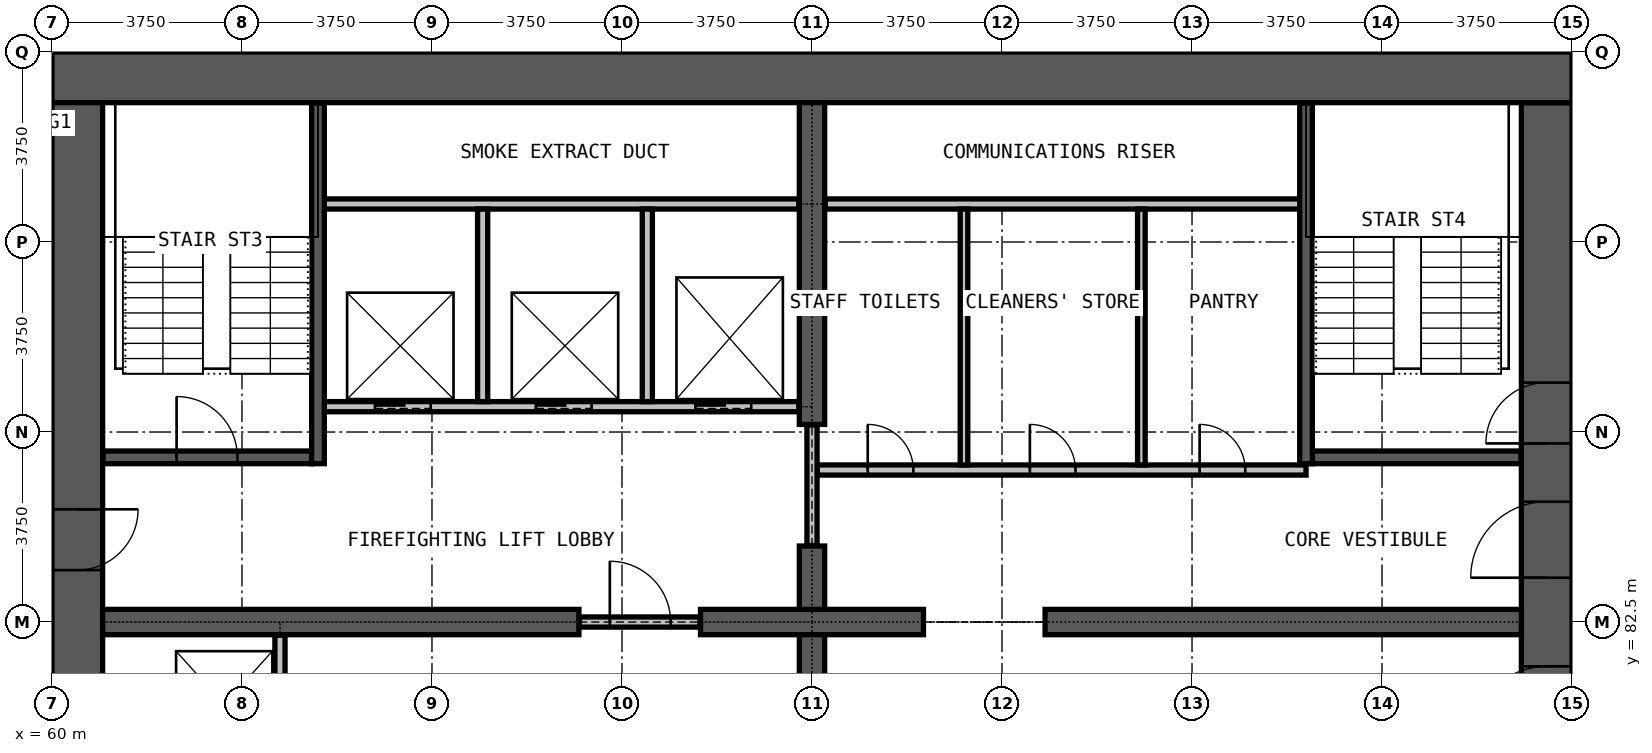
"""IFC4 building model, lengths in metres.
Left out: names, types, materials, properties, quantities, classifications, styles, units other than length and angle.
Written with IfcOpenShell. Run it as: python <this file> out.ifc"""

import sys

from ifc_helpers import new_model, si_unit, direction, frame, frame_2d, origin, place, context, subcontext, project, spatial, rectangle, extrude, element, fill, save


model = new_model("IFC4")
c1 = context("Model", 3, precision=1e-05, world=origin(), true_north=direction((0.0, 1.0)))
c2 = subcontext(c1, "Body", "Model", "MODEL_VIEW")
j1 = project(units=[si_unit("LENGTHUNIT", "METRE"), si_unit("PLANEANGLEUNIT", "RADIAN")], contexts=[c1])
p1 = place(None, origin())
s1 = spatial("IfcSite", under=j1, at=p1, CompositionType="ELEMENT")
p2 = place(p1, origin())
s2 = spatial("IfcBuilding", under=s1, at=p2, CompositionType="ELEMENT")
p3 = place(p2, frame((0.0, 0.0, 89.0)))
s3 = spatial("IfcBuildingStorey", under=s2, at=p3, CompositionType="ELEMENT", Elevation=89.0)
p4 = place(p3, frame((89.5, 72.25, 0.0), z_axis=(0.0, 0.0, 1.0), x_axis=(0.0, 1.0, 0.0)))
e1 = element("IfcWall", 1, at=p4, inside=s3, PredefinedType="SHEAR", context=c2, shape_type="SweptSolid", body=[
    extrude(rectangle(XDim=20.5, YDim=1.0, at=frame_2d((10.25, 0.0))), origin(), (0.0, 0.0, 1.0), 3.3),
])
p5 = place(p4, frame((0.275, 0.0, 0.0)))
e2 = element("IfcOpeningElement", 2, at=p5, cuts=e1, PredefinedType="OPENING", context=c2, shape_type="SweptSolid", body=[
    extrude(rectangle(XDim=1.2, YDim=2.2, at=frame_2d((0.6, 1.1))), frame((0.0, 0.51, 0.0), z_axis=(0.0, -1.0, 0.0), x_axis=(1.0, 0.0, 0.0)), (0.0, 0.0, 1.0), 1.02),
])
p6 = place(p4, frame((13.775, 0.0, 0.0)))
e3 = element("IfcOpeningElement", 3, at=p6, cuts=e1, PredefinedType="OPENING", context=c2, shape_type="SweptSolid", body=[
    extrude(rectangle(XDim=1.2, YDim=2.2, at=frame_2d((0.6, 1.1))), frame((0.0, 0.51, 0.0), z_axis=(0.0, -1.0, 0.0), x_axis=(1.0, 0.0, 0.0)), (0.0, 0.0, 1.0), 1.02),
])
p7 = place(p4, frame((7.875, 0.0, 0.0)))
e4 = element("IfcOpeningElement", 4, at=p7, cuts=e1, PredefinedType="OPENING", context=c2, shape_type="SweptSolid", body=[
    extrude(rectangle(XDim=1.5, YDim=2.2, at=frame_2d((0.75, 1.1))), frame((0.0, 0.51, 0.0), z_axis=(0.0, -1.0, 0.0), x_axis=(1.0, 0.0, 0.0)), (0.0, 0.0, 1.0), 1.02),
])
p8 = place(p4, frame((11.125, 0.0, 0.0)))
e5 = element("IfcOpeningElement", 5, at=p8, cuts=e1, PredefinedType="OPENING", context=c2, shape_type="SweptSolid", body=[
    extrude(rectangle(XDim=1.5, YDim=2.2, at=frame_2d((0.75, 1.1))), frame((0.0, 0.51, 0.0), z_axis=(0.0, -1.0, 0.0), x_axis=(1.0, 0.0, 0.0)), (0.0, 0.0, 1.0), 1.02),
])
p9 = place(p3, frame((90.0, 93.25, 0.0), z_axis=(0.0, 0.0, 1.0), x_axis=(-1.0, 0.0, 0.0)))
e6 = element("IfcWall", 6, at=p9, inside=s3, PredefinedType="SHEAR", context=c2, shape_type="SweptSolid", body=[
    extrude(rectangle(XDim=30.0, YDim=1.0, at=frame_2d((15.0, 0.0))), origin(), (0.0, 0.0, 1.0), 3.3),
])
p10 = place(p3, frame((60.5, 92.75, 0.0), z_axis=(0.0, 0.0, 1.0), x_axis=(0.0, -1.0, 0.0)))
e7 = element("IfcWall", 7, at=p10, inside=s3, PredefinedType="SHEAR", context=c2, shape_type="SweptSolid", body=[
    extrude(rectangle(XDim=20.5, YDim=1.0, at=frame_2d((10.25, 0.0))), origin(), (0.0, 0.0, 1.0), 3.3),
])
p11 = place(p10, frame((19.025, 0.0, 0.0)))
e8 = element("IfcOpeningElement", 8, at=p11, cuts=e7, PredefinedType="OPENING", context=c2, shape_type="SweptSolid", body=[
    extrude(rectangle(XDim=1.2, YDim=2.2, at=frame_2d((0.6, 1.1))), frame((0.0, 0.51, 0.0), z_axis=(0.0, -1.0, 0.0), x_axis=(1.0, 0.0, 0.0)), (0.0, 0.0, 1.0), 1.02),
])
p12 = place(p10, frame((8.025, 0.0, 0.0)))
e9 = element("IfcOpeningElement", 9, at=p12, cuts=e7, PredefinedType="OPENING", context=c2, shape_type="SweptSolid", body=[
    extrude(rectangle(XDim=1.2, YDim=2.2, at=frame_2d((0.6, 1.1))), frame((0.0, 0.51, 0.0), z_axis=(0.0, -1.0, 0.0), x_axis=(1.0, 0.0, 0.0)), (0.0, 0.0, 1.0), 1.02),
])
p13 = place(p3, frame((61.0, 82.5, 0.0), z_axis=(0.0, 0.0, 1.0), x_axis=(1.0, 0.0, 0.0)))
e10 = element("IfcWall", 10, at=p13, inside=s3, PredefinedType="SHEAR", context=c2, shape_type="SweptSolid", body=[
    extrude(rectangle(XDim=9.4, YDim=0.5, at=frame_2d((4.7, 0.0))), origin(), (0.0, 0.0, 1.0), 3.3),
])
p14 = place(p3, frame((72.8, 82.5, 0.0), z_axis=(0.0, 0.0, 1.0), x_axis=(1.0, 0.0, 0.0)))
e11 = element("IfcWall", 11, at=p14, inside=s3, PredefinedType="SHEAR", context=c2, shape_type="SweptSolid", body=[
    extrude(rectangle(XDim=4.4, YDim=0.5, at=frame_2d((2.2, 0.0))), origin(), (0.0, 0.0, 1.0), 3.3),
])
p15 = place(p3, frame((79.6, 82.5, 0.0), z_axis=(0.0, 0.0, 1.0), x_axis=(1.0, 0.0, 0.0)))
e12 = element("IfcWall", 12, at=p15, inside=s3, PredefinedType="SHEAR", context=c2, shape_type="SweptSolid", body=[
    extrude(rectangle(XDim=9.4, YDim=0.5, at=frame_2d((4.7, 0.0))), origin(), (0.0, 0.0, 1.0), 3.3),
])
for number, where, z_axis, x_axis in (
    (13, (75.0, 81.0, 0.0), (0.0, 0.0, 1.0), (0.0, 1.0, 0.0)),
    (14, (75.0, 82.75, 0.0), (0.0, 0.0, 1.0), (0.0, 1.0, 0.0)),
):
    element("IfcWall", number, at=place(p3, frame(where, z_axis=z_axis, x_axis=x_axis)), inside=s3, PredefinedType="SHEAR", context=c2, shape_type="SweptSolid", body=[
        extrude(rectangle(XDim=1.25, YDim=0.5, at=frame_2d((0.625, 0.0))), origin(), (0.0, 0.0, 1.0), 3.3),
    ])
p16 = place(p3, frame((75.0, 86.4, 0.0), z_axis=(0.0, 0.0, 1.0), x_axis=(0.0, 1.0, 0.0)))
e15 = element("IfcWall", 15, at=p16, inside=s3, PredefinedType="SHEAR", context=c2, shape_type="SweptSolid", body=[
    extrude(rectangle(XDim=6.35, YDim=0.5, at=frame_2d((3.175, 0.0))), origin(), (0.0, 0.0, 1.0), 3.3),
])
p17 = place(p3, frame((70.41, 82.5, 0.0), z_axis=(0.0, 0.0, 1.0), x_axis=(1.0, 0.0, 0.0)))
e16 = element("IfcWall", 16, at=p17, inside=s3, PredefinedType="PARTITIONING", context=c2, shape_type="SweptSolid", body=[
    extrude(rectangle(XDim=2.38, YDim=0.2, at=frame_2d((1.19, 0.0))), origin(), (0.0, 0.0, 1.0), 2.4),
])
p18 = place(p17, frame((0.6, 0.0, 0.0)))
e17 = element("IfcOpeningElement", 17, at=p18, cuts=e16, PredefinedType="OPENING", context=c2, shape_type="SweptSolid", body=[
    extrude(rectangle(XDim=1.2, YDim=2.2, at=frame_2d((0.6, 1.1))), frame((0.0, 0.11, 0.0), z_axis=(0.0, -1.0, 0.0), x_axis=(1.0, 0.0, 0.0)), (0.0, 0.0, 1.0), 0.22),
])
p19 = place(p3, frame((75.1, 85.5, 0.0), z_axis=(0.0, 0.0, 1.0), x_axis=(1.0, 0.0, 0.0)))
e18 = element("IfcWall", 18, at=p19, inside=s3, PredefinedType="PARTITIONING", context=c2, shape_type="SweptSolid", body=[
    extrude(rectangle(XDim=9.65, YDim=0.2, at=frame_2d((4.825, 0.0))), origin(), (0.0, 0.0, 1.0), 3.0),
])
p20 = place(p19, frame((1.0, 0.0, 0.0)))
e19 = element("IfcOpeningElement", 19, at=p20, cuts=e18, PredefinedType="OPENING", context=c2, shape_type="SweptSolid", body=[
    extrude(rectangle(XDim=0.9, YDim=2.2, at=frame_2d((0.45, 1.1))), frame((0.0, 0.11, 0.0), z_axis=(0.0, -1.0, 0.0), x_axis=(1.0, 0.0, 0.0)), (0.0, 0.0, 1.0), 0.22),
])
p21 = place(p19, frame((4.2, 0.0, 0.0)))
e20 = element("IfcOpeningElement", 20, at=p21, cuts=e18, PredefinedType="OPENING", context=c2, shape_type="SweptSolid", body=[
    extrude(rectangle(XDim=0.9, YDim=2.2, at=frame_2d((0.45, 1.1))), frame((0.0, 0.11, 0.0), z_axis=(0.0, -1.0, 0.0), x_axis=(1.0, 0.0, 0.0)), (0.0, 0.0, 1.0), 0.22),
])
p22 = place(p19, frame((7.55, 0.0, 0.0)))
e21 = element("IfcOpeningElement", 21, at=p22, cuts=e18, PredefinedType="OPENING", context=c2, shape_type="SweptSolid", body=[
    extrude(rectangle(XDim=0.9, YDim=2.2, at=frame_2d((0.45, 1.1))), frame((0.0, 0.11, 0.0), z_axis=(0.0, -1.0, 0.0), x_axis=(1.0, 0.0, 0.0)), (0.0, 0.0, 1.0), 0.22),
])
p23 = place(p3, frame((75.26, 90.75, 0.0), z_axis=(0.0, 0.0, 1.0), x_axis=(1.0, 0.0, 0.0)))
e22 = element("IfcWall", 22, at=p23, inside=s3, PredefinedType="PARTITIONING", context=c2, shape_type="SweptSolid", body=[
    extrude(rectangle(XDim=9.365, YDim=0.2, at=frame_2d((4.683, 0.0))), origin(), (0.0, 0.0, 1.0), 3.0),
])
p24 = place(p3, frame((75.0, 84.01, 0.0), z_axis=(0.0, 0.0, 1.0), x_axis=(0.0, 1.0, 0.0)))
e23 = element("IfcWall", 23, at=p24, inside=s3, PredefinedType="PARTITIONING", context=c2, shape_type="SweptSolid", body=[
    extrude(rectangle(XDim=2.38, YDim=0.2, at=frame_2d((1.19, 0.0))), origin(), (0.0, 0.0, 1.0), 2.4),
])
for number, where, z_axis, x_axis in (
    (24, (78.0, 85.6, 0.0), (0.0, 0.0, 1.0), (0.0, 1.0, 0.0)),
    (25, (81.5, 85.6, 0.0), (0.0, 0.0, 1.0), (0.0, 1.0, 0.0)),
):
    element("IfcWall", number, at=place(p3, frame(where, z_axis=z_axis, x_axis=x_axis)), inside=s3, PredefinedType="PARTITIONING", context=c2, shape_type="SweptSolid", body=[
        extrude(rectangle(XDim=5.05, YDim=0.15, at=frame_2d((2.525, 0.0))), origin(), (0.0, 0.0, 1.0), 3.0),
    ])
p25 = place(p3, frame((65.375, 86.75, 0.0), z_axis=(0.0, 0.0, 1.0), x_axis=(1.0, 0.0, 0.0)))
e26 = element("IfcWall", 26, at=p25, inside=s3, PredefinedType="PARTITIONING", context=c2, shape_type="SweptSolid", body=[
    extrude(rectangle(XDim=9.365, YDim=0.2, at=frame_2d((4.683, 0.0))), origin(), (0.0, 0.0, 1.0), 3.0),
])
p26 = place(p25, frame((1.0, 0.0, 0.0)))
e27 = element("IfcOpeningElement", 27, at=p26, cuts=e26, PredefinedType="OPENING", context=c2, shape_type="SweptSolid", body=[
    extrude(rectangle(XDim=1.1, YDim=2.2, at=frame_2d((0.55, 1.1))), frame((0.0, 0.11, 0.0), z_axis=(0.0, -1.0, 0.0), x_axis=(1.0, 0.0, 0.0)), (0.0, 0.0, 1.0), 0.22),
])
p27 = place(p25, frame((4.175, 0.0, 0.0)))
e28 = element("IfcOpeningElement", 28, at=p27, cuts=e26, PredefinedType="OPENING", context=c2, shape_type="SweptSolid", body=[
    extrude(rectangle(XDim=1.1, YDim=2.2, at=frame_2d((0.55, 1.1))), frame((0.0, 0.11, 0.0), z_axis=(0.0, -1.0, 0.0), x_axis=(1.0, 0.0, 0.0)), (0.0, 0.0, 1.0), 0.22),
])
p28 = place(p25, frame((7.325, 0.0, 0.0)))
e29 = element("IfcOpeningElement", 29, at=p28, cuts=e26, PredefinedType="OPENING", context=c2, shape_type="SweptSolid", body=[
    extrude(rectangle(XDim=1.1, YDim=2.2, at=frame_2d((0.55, 1.1))), frame((0.0, 0.11, 0.0), z_axis=(0.0, -1.0, 0.0), x_axis=(1.0, 0.0, 0.0)), (0.0, 0.0, 1.0), 0.22),
])
p29 = place(p3, frame((65.375, 90.75, 0.0), z_axis=(0.0, 0.0, 1.0), x_axis=(1.0, 0.0, 0.0)))
e30 = element("IfcWall", 30, at=p29, inside=s3, PredefinedType="PARTITIONING", context=c2, shape_type="SweptSolid", body=[
    extrude(rectangle(XDim=9.365, YDim=0.2, at=frame_2d((4.683, 0.0))), origin(), (0.0, 0.0, 1.0), 3.0),
])
p30 = place(p3, frame((64.5, 79.375, 0.0), z_axis=(0.0, 0.0, 1.0), x_axis=(0.0, 1.0, 0.0)))
e31 = element("IfcWall", 31, at=p30, inside=s3, PredefinedType="PARTITIONING", context=c2, shape_type="SweptSolid", body=[
    extrude(rectangle(XDim=2.865, YDim=0.2, at=frame_2d((1.433, 0.0))), origin(), (0.0, 0.0, 1.0), 3.0),
])
for number, where, z_axis, x_axis in (
    (32, (68.5, 86.85, 0.0), (0.0, 0.0, 1.0), (0.0, 1.0, 0.0)),
    (33, (71.75, 86.85, 0.0), (0.0, 0.0, 1.0), (0.0, 1.0, 0.0)),
):
    element("IfcWall", number, at=place(p3, frame(where, z_axis=z_axis, x_axis=x_axis)), inside=s3, PredefinedType="PARTITIONING", context=c2, shape_type="SweptSolid", body=[
        extrude(rectangle(XDim=3.8, YDim=0.2, at=frame_2d((1.9, 0.0))), origin(), (0.0, 0.0, 1.0), 3.0),
    ])
p31 = place(p3, frame((61.01, 85.75, 0.0), z_axis=(0.0, 0.0, 1.0), x_axis=(1.0, 0.0, 0.0)))
e34 = element("IfcWall", 34, at=p31, inside=s3, PredefinedType="PARTITIONING", context=c2, shape_type="SweptSolid", body=[
    extrude(rectangle(XDim=4.115, YDim=0.25, at=frame_2d((2.058, 0.0))), origin(), (0.0, 0.0, 1.0), 3.0),
])
p32 = place(p31, frame((1.45, 0.0, 0.0)))
e35 = element("IfcOpeningElement", 35, at=p32, cuts=e34, PredefinedType="OPENING", context=c2, shape_type="SweptSolid", body=[
    extrude(rectangle(XDim=1.2, YDim=2.2, at=frame_2d((0.6, 1.1))), frame((0.0, 0.135, 0.0), z_axis=(0.0, -1.0, 0.0), x_axis=(1.0, 0.0, 0.0)), (0.0, 0.0, 1.0), 0.27),
])
p33 = place(p3, frame((84.875, 85.75, 0.0), z_axis=(0.0, 0.0, 1.0), x_axis=(1.0, 0.0, 0.0)))
e36 = element("IfcWall", 36, at=p33, inside=s3, PredefinedType="PARTITIONING", context=c2, shape_type="SweptSolid", body=[
    extrude(rectangle(XDim=4.115, YDim=0.25, at=frame_2d((2.058, 0.0))), origin(), (0.0, 0.0, 1.0), 3.0),
])
for number, where, z_axis, x_axis in (
    (37, (65.25, 85.625, 0.0), (0.0, 0.0, 1.0), (0.0, 1.0, 0.0)),
    (38, (84.75, 85.625, 0.0), (0.0, 0.0, 1.0), (0.0, 1.0, 0.0)),
):
    element("IfcWall", number, at=place(p3, frame(where, z_axis=z_axis, x_axis=x_axis)), inside=s3, PredefinedType="PARTITIONING", context=c2, shape_type="SweptSolid", body=[
        extrude(rectangle(XDim=7.115, YDim=0.25, at=frame_2d((3.558, 0.0))), origin(), (0.0, 0.0, 1.0), 3.0),
    ])
p34 = place(p26, origin())
e39 = element("IfcDoor", 39, at=p34, inside=s3, OperationType="DOUBLE_DOOR_SLIDING", PredefinedType="DOOR", context=c2, shape_type="SweptSolid", body=[
    extrude(rectangle(XDim=1.1, YDim=2.2, at=frame_2d((0.55, 1.1))), frame((0.0, 0.025, 0.0), z_axis=(0.0, -1.0, 0.0), x_axis=(1.0, 0.0, 0.0)), (0.0, 0.0, 1.0), 0.05),
])
fill(e27, e39)
p35 = place(p27, origin())
e40 = element("IfcDoor", 40, at=p35, inside=s3, OperationType="DOUBLE_DOOR_SLIDING", PredefinedType="DOOR", context=c2, shape_type="SweptSolid", body=[
    extrude(rectangle(XDim=1.1, YDim=2.2, at=frame_2d((0.55, 1.1))), frame((0.0, 0.025, 0.0), z_axis=(0.0, -1.0, 0.0), x_axis=(1.0, 0.0, 0.0)), (0.0, 0.0, 1.0), 0.05),
])
fill(e28, e40)
p36 = place(p28, origin())
e41 = element("IfcDoor", 41, at=p36, inside=s3, OperationType="DOUBLE_DOOR_SLIDING", PredefinedType="DOOR", context=c2, shape_type="SweptSolid", body=[
    extrude(rectangle(XDim=1.1, YDim=2.2, at=frame_2d((0.55, 1.1))), frame((0.0, 0.025, 0.0), z_axis=(0.0, -1.0, 0.0), x_axis=(1.0, 0.0, 0.0)), (0.0, 0.0, 1.0), 0.05),
])
fill(e29, e41)
p37 = place(p18, origin())
e42 = element("IfcDoor", 42, at=p37, inside=s3, OperationType="SINGLE_SWING_LEFT", PredefinedType="DOOR", context=c2, shape_type="SweptSolid", body=[
    extrude(rectangle(XDim=1.2, YDim=2.2, at=frame_2d((0.6, 1.1))), frame((0.0, 0.025, 0.0), z_axis=(0.0, -1.0, 0.0), x_axis=(1.0, 0.0, 0.0)), (0.0, 0.0, 1.0), 0.05),
])
fill(e17, e42)
p38 = place(p32, origin())
e43 = element("IfcDoor", 43, at=p38, inside=s3, OperationType="SINGLE_SWING_LEFT", PredefinedType="DOOR", context=c2, shape_type="SweptSolid", body=[
    extrude(rectangle(XDim=1.2, YDim=2.2, at=frame_2d((0.6, 1.1))), frame((0.0, 0.025, 0.0), z_axis=(0.0, -1.0, 0.0), x_axis=(1.0, 0.0, 0.0)), (0.0, 0.0, 1.0), 0.05),
])
fill(e35, e43)
p39 = place(p6, origin())
e44 = element("IfcDoor", 44, at=p39, inside=s3, OperationType="SINGLE_SWING_RIGHT", PredefinedType="DOOR", context=c2, shape_type="SweptSolid", body=[
    extrude(rectangle(XDim=1.2, YDim=2.2, at=frame_2d((0.6, 1.1))), frame((0.0, 0.025, 0.0), z_axis=(0.0, -1.0, 0.0), x_axis=(1.0, 0.0, 0.0)), (0.0, 0.0, 1.0), 0.05),
])
fill(e3, e44)
p40 = place(p7, origin())
e45 = element("IfcDoor", 45, at=p40, inside=s3, OperationType="DOUBLE_DOOR_SINGLE_SWING", PredefinedType="DOOR", context=c2, shape_type="SweptSolid", body=[
    extrude(rectangle(XDim=1.5, YDim=2.2, at=frame_2d((0.75, 1.1))), frame((0.0, 0.025, 0.0), z_axis=(0.0, -1.0, 0.0), x_axis=(1.0, 0.0, 0.0)), (0.0, 0.0, 1.0), 0.05),
])
fill(e4, e45)
p41 = place(p12, origin())
e46 = element("IfcDoor", 46, at=p41, inside=s3, OperationType="SINGLE_SWING_LEFT", PredefinedType="DOOR", context=c2, shape_type="SweptSolid", body=[
    extrude(rectangle(XDim=1.2, YDim=2.2, at=frame_2d((0.6, 1.1))), frame((0.0, 0.025, 0.0), z_axis=(0.0, -1.0, 0.0), x_axis=(1.0, 0.0, 0.0)), (0.0, 0.0, 1.0), 0.05),
])
fill(e9, e46)
p42 = place(p8, origin())
e47 = element("IfcDoor", 47, at=p42, inside=s3, OperationType="DOUBLE_DOOR_SINGLE_SWING", PredefinedType="DOOR", context=c2, shape_type="SweptSolid", body=[
    extrude(rectangle(XDim=1.5, YDim=2.2, at=frame_2d((0.75, 1.1))), frame((0.0, 0.025, 0.0), z_axis=(0.0, -1.0, 0.0), x_axis=(1.0, 0.0, 0.0)), (0.0, 0.0, 1.0), 0.05),
])
fill(e5, e47)
p43 = place(p20, origin())
e48 = element("IfcDoor", 48, at=p43, inside=s3, OperationType="SINGLE_SWING_LEFT", PredefinedType="DOOR", context=c2, shape_type="SweptSolid", body=[
    extrude(rectangle(XDim=0.9, YDim=2.2, at=frame_2d((0.45, 1.1))), frame((0.0, 0.025, 0.0), z_axis=(0.0, -1.0, 0.0), x_axis=(1.0, 0.0, 0.0)), (0.0, 0.0, 1.0), 0.05),
])
fill(e19, e48)
p44 = place(p21, origin())
e49 = element("IfcDoor", 49, at=p44, inside=s3, OperationType="SINGLE_SWING_RIGHT", PredefinedType="DOOR", context=c2, shape_type="SweptSolid", body=[
    extrude(rectangle(XDim=0.9, YDim=2.2, at=frame_2d((0.45, 1.1))), frame((0.0, 0.025, 0.0), z_axis=(0.0, -1.0, 0.0), x_axis=(1.0, 0.0, 0.0)), (0.0, 0.0, 1.0), 0.05),
])
fill(e20, e49)
p45 = place(p22, origin())
e50 = element("IfcDoor", 50, at=p45, inside=s3, OperationType="SINGLE_SWING_LEFT", PredefinedType="DOOR", context=c2, shape_type="SweptSolid", body=[
    extrude(rectangle(XDim=0.9, YDim=2.2, at=frame_2d((0.45, 1.1))), frame((0.0, 0.025, 0.0), z_axis=(0.0, -1.0, 0.0), x_axis=(1.0, 0.0, 0.0)), (0.0, 0.0, 1.0), 0.05),
])
fill(e21, e50)
save(model, sys.argv[1])
